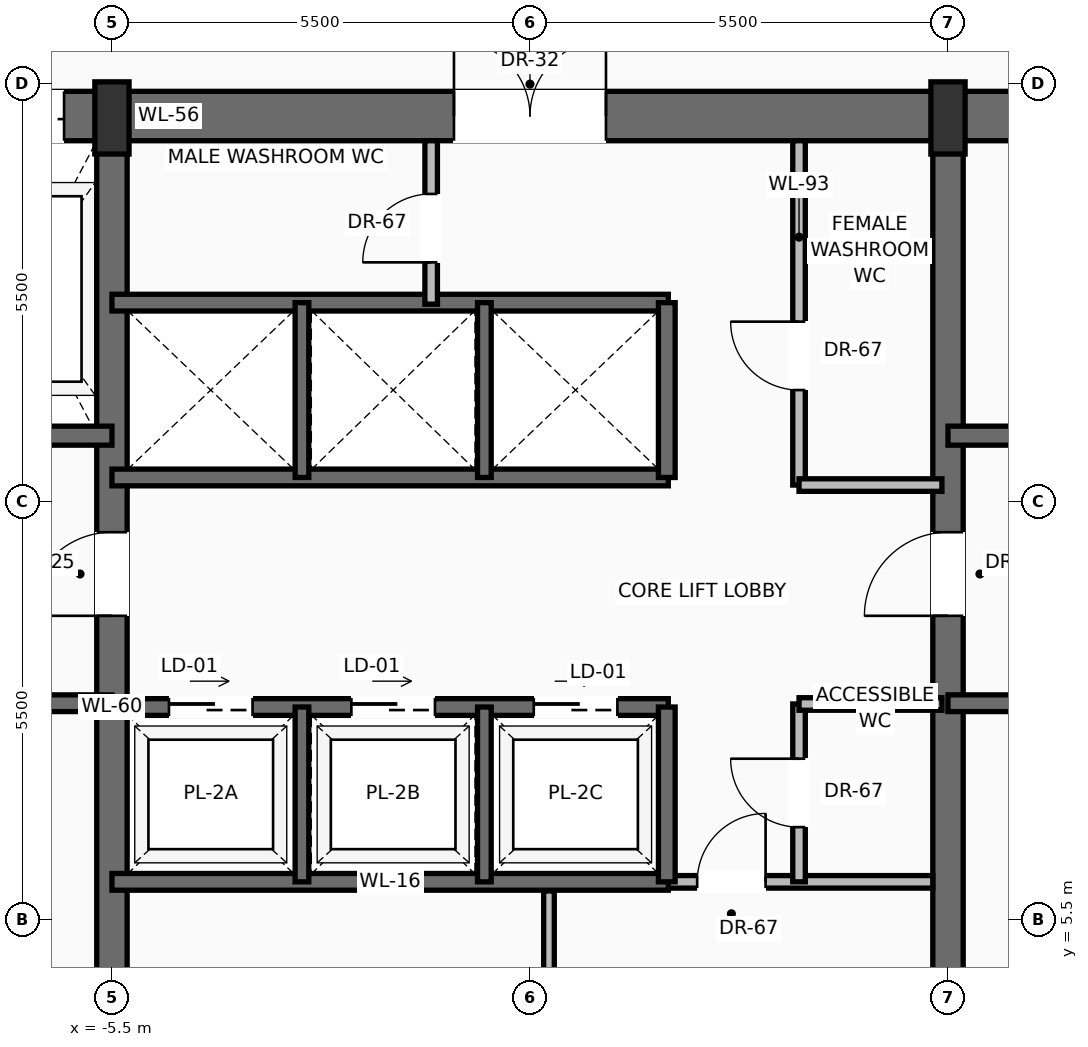
"""IFC4 building model, lengths in metres.
Left out: names, types, materials, properties, quantities, classifications, styles, units other than length and angle.
Written with IfcOpenShell. Run it as: python <this file> out.ifc"""

import sys

from ifc_helpers import new_model, si_unit, direction, frame, frame_2d, origin, origin_2d, place, context, subcontext, project, spatial, rectangle, extrude, source, transform, mapped, element, fill, save


model = new_model("IFC4")
c1 = context("Model", 3, precision=1e-05, world=origin(), true_north=direction((0.0, 1.0)))
c2 = subcontext(c1, "Body", "Model", "MODEL_VIEW")
j1 = project(units=[si_unit("LENGTHUNIT", "METRE"), si_unit("PLANEANGLEUNIT", "RADIAN")], contexts=[c1])
p1 = place(None, origin())
s1 = spatial("IfcSite", under=j1, at=p1, CompositionType="ELEMENT")
p2 = place(p1, origin())
s2 = spatial("IfcBuilding", under=s1, at=p2, CompositionType="ELEMENT")
p3 = place(p2, frame((0.0, 0.0, 185.8)))
s3 = spatial("IfcBuildingStorey", under=s2, at=p3, CompositionType="ELEMENT", Elevation=185.8)
p4 = place(p3, frame((-10.8, 16.075, 0.0), z_axis=(0.0, 0.0, 1.0), x_axis=(1.0, 0.0, 0.0)))
e1 = element("IfcWall", 1, at=p4, inside=s3, PredefinedType="SHEAR", context=c2, shape_type="SweptSolid", body=[
    extrude(rectangle(XDim=21.6, YDim=0.65, at=frame_2d((10.8, 0.0))), origin(), (0.0, 0.0, 1.0), 3.47),
])
p5 = place(p4, frame((3.37, 0.0, 0.0)))
e2 = element("IfcOpeningElement", 2, at=p5, cuts=e1, PredefinedType="OPENING", context=c2, shape_type="SweptSolid", body=[
    extrude(rectangle(XDim=1.3, YDim=2.3, at=frame_2d((0.65, 1.15))), frame((0.0, 0.335, 0.0), z_axis=(0.0, -1.0, 0.0), x_axis=(1.0, 0.0, 0.0)), (0.0, 0.0, 1.0), 0.67),
])
p6 = place(p4, frame((9.8, 0.0, 0.0)))
e3 = element("IfcOpeningElement", 3, at=p6, cuts=e1, PredefinedType="OPENING", context=c2, shape_type="SweptSolid", body=[
    extrude(rectangle(XDim=2.0, YDim=2.4, at=frame_2d((1.0, 1.2))), frame((0.0, 0.335, 0.0), z_axis=(0.0, -1.0, 0.0), x_axis=(1.0, 0.0, 0.0)), (0.0, 0.0, 1.0), 0.67),
])
p7 = place(p3, frame((-5.5, 0.525, 0.0), z_axis=(0.0, 0.0, 1.0), x_axis=(0.0, 1.0, 0.0)))
e4 = element("IfcWall", 4, at=p7, inside=s3, PredefinedType="SHEAR", context=c2, shape_type="SweptSolid", body=[
    extrude(rectangle(XDim=15.55, YDim=0.4, at=frame_2d((7.775, 0.0))), origin(), (0.0, 0.0, 1.0), 3.47),
])
p8 = place(p7, frame((8.975, 0.0, 0.0)))
e5 = element("IfcOpeningElement", 5, at=p8, cuts=e4, PredefinedType="OPENING", context=c2, shape_type="SweptSolid", body=[
    extrude(rectangle(XDim=1.1, YDim=2.2, at=frame_2d((0.55, 1.1))), frame((0.0, 0.21, 0.0), z_axis=(0.0, -1.0, 0.0), x_axis=(1.0, 0.0, 0.0)), (0.0, 0.0, 1.0), 0.42),
])
p9 = place(p3, frame((5.5, 0.525, 0.0), z_axis=(0.0, 0.0, 1.0), x_axis=(0.0, 1.0, 0.0)))
e6 = element("IfcWall", 6, at=p9, inside=s3, PredefinedType="SHEAR", context=c2, shape_type="SweptSolid", body=[
    extrude(rectangle(XDim=15.55, YDim=0.4, at=frame_2d((7.775, 0.0))), origin(), (0.0, 0.0, 1.0), 3.47),
])
p10 = place(p9, frame((8.975, 0.0, 0.0)))
e7 = element("IfcOpeningElement", 7, at=p10, cuts=e6, PredefinedType="OPENING", context=c2, shape_type="SweptSolid", body=[
    extrude(rectangle(XDim=1.1, YDim=2.2, at=frame_2d((0.55, 1.1))), frame((0.0, 0.21, 0.0), z_axis=(0.0, -1.0, 0.0), x_axis=(1.0, 0.0, 0.0)), (0.0, 0.0, 1.0), 0.42),
])
m1 = source(origin(), c2, "Body", "SweptSolid", [
    extrude(rectangle(XDim=0.45, YDim=0.95, at=origin_2d()), origin(), (0.0, 0.0, 1.0), 3.7),
])
for number, where, z_axis, x_axis in (
    (8, (-5.5, 16.05, 0.0), (0.0, 0.0, 1.0), (1.0, 0.0, 0.0)),
    (9, (5.5, 16.05, 0.0), (0.0, 0.0, 1.0), (1.0, 0.0, 0.0)),
):
    element("IfcColumn", number, at=place(p3, frame(where, z_axis=z_axis, x_axis=x_axis)), inside=s3, PredefinedType="PILASTER", context=c2, shape_type="MappedRepresentation", body=[
        mapped(m1, transform((0.0, 0.0, 0.0), scale=1.0)),
    ])
p11 = place(p3, frame((-5.5, 8.35, 0.0), z_axis=(0.0, 0.0, 1.0), x_axis=(-1.0, 0.0, 0.0)))
e10 = element("IfcWall", 10, at=p11, inside=s3, PredefinedType="SOLIDWALL", context=c2, shape_type="SweptSolid", body=[
    extrude(rectangle(XDim=4.65, YDim=0.22, at=frame_2d((2.325, 0.0))), origin(), (0.0, 0.0, 1.0), 3.47),
])
p12 = place(p11, frame((2.5, 0.0, 0.0)))
e11 = element("IfcOpeningElement", 11, at=p12, cuts=e10, PredefinedType="OPENING", context=c2, shape_type="SweptSolid", body=[
    extrude(rectangle(XDim=1.15, YDim=2.2, at=frame_2d((0.575, 1.1))), frame((0.0, 0.12, 0.0), z_axis=(0.0, -1.0, 0.0), x_axis=(1.0, 0.0, 0.0)), (0.0, 0.0, 1.0), 0.24),
])
p13 = place(p3, frame((-5.5, 11.87, 0.0), z_axis=(0.0, 0.0, 1.0), x_axis=(-1.0, 0.0, 0.0)))
e12 = element("IfcWall", 12, at=p13, inside=s3, PredefinedType="SOLIDWALL", context=c2, shape_type="SweptSolid", body=[
    extrude(rectangle(XDim=4.65, YDim=0.25, at=frame_2d((2.325, 0.0))), origin(), (0.0, 0.0, 1.0), 3.47),
])
p14 = place(p13, frame((2.95, 0.0, 0.0)))
e13 = element("IfcOpeningElement", 13, at=p14, cuts=e12, PredefinedType="OPENING", context=c2, shape_type="SweptSolid", body=[
    extrude(rectangle(XDim=1.2, YDim=2.25, at=frame_2d((0.6, 1.125))), frame((0.0, 0.135, 0.0), z_axis=(0.0, -1.0, 0.0), x_axis=(1.0, 0.0, 0.0)), (0.0, 0.0, 1.0), 0.27),
])
p15 = place(p3, frame((10.15, 8.35, 0.0), z_axis=(0.0, 0.0, 1.0), x_axis=(-1.0, 0.0, 0.0)))
e14 = element("IfcWall", 14, at=p15, inside=s3, PredefinedType="SOLIDWALL", context=c2, shape_type="SweptSolid", body=[
    extrude(rectangle(XDim=4.65, YDim=0.22, at=frame_2d((2.325, 0.0))), origin(), (0.0, 0.0, 1.0), 3.47),
])
p16 = place(p15, frame((1.0, 0.0, 0.0)))
e15 = element("IfcOpeningElement", 15, at=p16, cuts=e14, PredefinedType="OPENING", context=c2, shape_type="SweptSolid", body=[
    extrude(rectangle(XDim=1.15, YDim=2.2, at=frame_2d((0.575, 1.1))), frame((0.0, 0.12, 0.0), z_axis=(0.0, -1.0, 0.0), x_axis=(1.0, 0.0, 0.0)), (0.0, 0.0, 1.0), 0.24),
])
p17 = place(p3, frame((10.15, 11.87, 0.0), z_axis=(0.0, 0.0, 1.0), x_axis=(-1.0, 0.0, 0.0)))
e16 = element("IfcWall", 16, at=p17, inside=s3, PredefinedType="SOLIDWALL", context=c2, shape_type="SweptSolid", body=[
    extrude(rectangle(XDim=4.65, YDim=0.25, at=frame_2d((2.325, 0.0))), origin(), (0.0, 0.0, 1.0), 3.47),
])
p18 = place(p17, frame((0.5, 0.0, 0.0)))
e17 = element("IfcOpeningElement", 17, at=p18, cuts=e16, PredefinedType="OPENING", context=c2, shape_type="SweptSolid", body=[
    extrude(rectangle(XDim=1.2, YDim=2.25, at=frame_2d((0.6, 1.125))), frame((0.0, 0.135, 0.0), z_axis=(0.0, -1.0, 0.0), x_axis=(1.0, 0.0, 0.0)), (0.0, 0.0, 1.0), 0.27),
])
p19 = place(p3, frame((1.82, 6.0, 0.0), z_axis=(0.0, 0.0, 1.0), x_axis=(1.0, 0.0, 0.0)))
e18 = element("IfcWall", 18, at=p19, inside=s3, PredefinedType="PARTITIONING", context=c2, shape_type="SweptSolid", body=[
    extrude(rectangle(XDim=3.48, YDim=0.165, at=frame_2d((1.74, 0.0))), origin(), (0.0, 0.0, 1.0), 3.462),
])
p20 = place(p19, frame((0.38, 0.0, 0.0)))
e19 = element("IfcOpeningElement", 19, at=p20, cuts=e18, PredefinedType="OPENING", context=c2, shape_type="SweptSolid", body=[
    extrude(rectangle(XDim=0.9, YDim=2.1, at=frame_2d((0.45, 1.05))), frame((0.0, 0.093, 0.0), z_axis=(0.0, -1.0, 0.0), x_axis=(1.0, 0.0, 0.0)), (0.0, 0.0, 1.0), 0.185),
])
p21 = place(p3, frame((0.25, 0.85, 0.0), z_axis=(0.0, 0.0, 1.0), x_axis=(0.0, 1.0, 0.0)))
e20 = element("IfcWall", 20, at=p21, inside=s3, PredefinedType="PARTITIONING", context=c2, shape_type="SweptSolid", body=[
    extrude(rectangle(XDim=5.03, YDim=0.14, at=frame_2d((2.515, 0.0))), origin(), (0.0, 0.0, 1.0), 3.462),
])
p22 = place(p21, frame((2.1, 0.0, 0.0)))
e21 = element("IfcOpeningElement", 21, at=p22, cuts=e20, PredefinedType="OPENING", context=c2, shape_type="SweptSolid", body=[
    extrude(rectangle(XDim=0.9, YDim=2.1, at=frame_2d((0.45, 1.05))), frame((0.0, 0.08, 0.0), z_axis=(0.0, -1.0, 0.0), x_axis=(1.0, 0.0, 0.0)), (0.0, 0.0, 1.0), 0.16),
])
p23 = place(p3, frame((3.54, 6.0, 0.0), z_axis=(0.0, 0.0, 1.0), x_axis=(0.0, 1.0, 0.0)))
e22 = element("IfcWall", 22, at=p23, inside=s3, PredefinedType="PARTITIONING", context=c2, shape_type="SweptSolid", body=[
    extrude(rectangle(XDim=2.34, YDim=0.165, at=frame_2d((1.17, 0.0))), origin(), (0.0, 0.0, 1.0), 3.462),
])
p24 = place(p23, frame((0.72, 0.0, 0.0)))
e23 = element("IfcOpeningElement", 23, at=p24, cuts=e22, PredefinedType="OPENING", context=c2, shape_type="SweptSolid", body=[
    extrude(rectangle(XDim=0.9, YDim=2.1, at=frame_2d((0.45, 1.05))), frame((0.0, 0.093, 0.0), z_axis=(0.0, -1.0, 0.0), x_axis=(1.0, 0.0, 0.0)), (0.0, 0.0, 1.0), 0.185),
])
p25 = place(p3, frame((3.54, 8.34, 0.0), z_axis=(0.0, 0.0, 1.0), x_axis=(1.0, 0.0, 0.0)))
e24 = element("IfcWall", 24, at=p25, inside=s3, PredefinedType="PARTITIONING", context=c2, shape_type="SweptSolid", body=[
    extrude(rectangle(XDim=1.88, YDim=0.165, at=frame_2d((0.94, 0.0))), origin(), (0.0, 0.0, 1.0), 3.462),
])
p26 = place(p3, frame((-5.5, 6.0, 0.0), z_axis=(0.0, 0.0, 1.0), x_axis=(1.0, 0.0, 0.0)))
e25 = element("IfcWall", 25, at=p26, inside=s3, PredefinedType="SOLIDWALL", context=c2, shape_type="SweptSolid", body=[
    extrude(rectangle(XDim=7.32, YDim=0.22, at=frame_2d((3.66, 0.0))), origin(), (0.0, 0.0, 1.0), 3.47),
])
p27 = place(p3, frame((-5.5, 8.3, 0.0), z_axis=(0.0, 0.0, 1.0), x_axis=(1.0, 0.0, 0.0)))
e26 = element("IfcWall", 26, at=p27, inside=s3, PredefinedType="SOLIDWALL", context=c2, shape_type="SweptSolid", body=[
    extrude(rectangle(XDim=7.32, YDim=0.22, at=frame_2d((3.66, 0.0))), origin(), (0.0, 0.0, 1.0), 3.47),
])
p28 = place(p27, frame((0.75, 0.0, 0.0)))
e27 = element("IfcOpeningElement", 27, at=p28, cuts=e26, PredefinedType="OPENING", context=c2, shape_type="SweptSolid", body=[
    extrude(rectangle(XDim=1.1, YDim=2.2, at=frame_2d((0.55, 1.1))), frame((0.0, 0.12, 0.0), z_axis=(0.0, -1.0, 0.0), x_axis=(1.0, 0.0, 0.0)), (0.0, 0.0, 1.0), 0.24),
])
p29 = place(p27, frame((3.15, 0.0, 0.0)))
e28 = element("IfcOpeningElement", 28, at=p29, cuts=e26, PredefinedType="OPENING", context=c2, shape_type="SweptSolid", body=[
    extrude(rectangle(XDim=1.1, YDim=2.2, at=frame_2d((0.55, 1.1))), frame((0.0, 0.12, 0.0), z_axis=(0.0, -1.0, 0.0), x_axis=(1.0, 0.0, 0.0)), (0.0, 0.0, 1.0), 0.24),
])
p30 = place(p27, frame((5.55, 0.0, 0.0)))
e29 = element("IfcOpeningElement", 29, at=p30, cuts=e26, PredefinedType="OPENING", context=c2, shape_type="SweptSolid", body=[
    extrude(rectangle(XDim=1.1, YDim=2.2, at=frame_2d((0.55, 1.1))), frame((0.0, 0.12, 0.0), z_axis=(0.0, -1.0, 0.0), x_axis=(1.0, 0.0, 0.0)), (0.0, 0.0, 1.0), 0.24),
])
p31 = place(p3, frame((1.8, 6.0, 0.0), z_axis=(0.0, 0.0, 1.0), x_axis=(0.0, 1.0, 0.0)))
e30 = element("IfcWall", 30, at=p31, inside=s3, PredefinedType="SOLIDWALL", context=c2, shape_type="SweptSolid", body=[
    extrude(rectangle(XDim=2.3, YDim=0.22, at=frame_2d((1.15, 0.0))), origin(), (0.0, 0.0, 1.0), 3.47),
])
for number, where, z_axis, x_axis in (
    (31, (-3.0, 6.0, 0.0), (0.0, 0.0, 1.0), (0.0, 1.0, 0.0)),
    (32, (-0.6, 6.0, 0.0), (0.0, 0.0, 1.0), (0.0, 1.0, 0.0)),
):
    element("IfcWall", number, at=place(p3, frame(where, z_axis=z_axis, x_axis=x_axis)), inside=s3, PredefinedType="SOLIDWALL", context=c2, shape_type="SweptSolid", body=[
        extrude(rectangle(XDim=2.3, YDim=0.18, at=frame_2d((1.15, 0.0))), origin(), (0.0, 0.0, 1.0), 3.47),
    ])
for number, where, z_axis, x_axis in (
    (33, (-5.5, 11.32, 0.0), (0.0, 0.0, 1.0), (1.0, 0.0, 0.0)),
    (34, (-5.5, 13.62, 0.0), (0.0, 0.0, 1.0), (1.0, 0.0, 0.0)),
):
    element("IfcWall", number, at=place(p3, frame(where, z_axis=z_axis, x_axis=x_axis)), inside=s3, PredefinedType="SOLIDWALL", context=c2, shape_type="SweptSolid", body=[
        extrude(rectangle(XDim=7.32, YDim=0.22, at=frame_2d((3.66, 0.0))), origin(), (0.0, 0.0, 1.0), 3.47),
    ])
p32 = place(p3, frame((1.8, 11.32, 0.0), z_axis=(0.0, 0.0, 1.0), x_axis=(0.0, 1.0, 0.0)))
e35 = element("IfcWall", 35, at=p32, inside=s3, PredefinedType="SOLIDWALL", context=c2, shape_type="SweptSolid", body=[
    extrude(rectangle(XDim=2.3, YDim=0.22, at=frame_2d((1.15, 0.0))), origin(), (0.0, 0.0, 1.0), 3.47),
])
for number, where, z_axis, x_axis in (
    (36, (-3.0, 11.32, 0.0), (0.0, 0.0, 1.0), (0.0, 1.0, 0.0)),
    (37, (-0.6, 11.32, 0.0), (0.0, 0.0, 1.0), (0.0, 1.0, 0.0)),
):
    element("IfcWall", number, at=place(p3, frame(where, z_axis=z_axis, x_axis=x_axis)), inside=s3, PredefinedType="SOLIDWALL", context=c2, shape_type="SweptSolid", body=[
        extrude(rectangle(XDim=2.3, YDim=0.18, at=frame_2d((1.15, 0.0))), origin(), (0.0, 0.0, 1.0), 3.47),
    ])
p33 = place(p3, frame((-1.3, 13.6, 0.0), z_axis=(0.0, 0.0, 1.0), x_axis=(0.0, 1.0, 0.0)))
e38 = element("IfcWall", 38, at=p33, inside=s3, PredefinedType="PARTITIONING", context=c2, shape_type="SweptSolid", body=[
    extrude(rectangle(XDim=2.15, YDim=0.165, at=frame_2d((1.075, 0.0))), origin(), (0.0, 0.0, 1.0), 3.462),
])
p34 = place(p33, frame((0.55, 0.0, 0.0)))
e39 = element("IfcOpeningElement", 39, at=p34, cuts=e38, PredefinedType="OPENING", context=c2, shape_type="SweptSolid", body=[
    extrude(rectangle(XDim=0.9, YDim=2.1, at=frame_2d((0.45, 1.05))), frame((0.0, 0.093, 0.0), z_axis=(0.0, -1.0, 0.0), x_axis=(1.0, 0.0, 0.0)), (0.0, 0.0, 1.0), 0.185),
])
p35 = place(p3, frame((3.54, 11.22, 0.0), z_axis=(0.0, 0.0, 1.0), x_axis=(0.0, 1.0, 0.0)))
e40 = element("IfcWall", 40, at=p35, inside=s3, PredefinedType="PARTITIONING", context=c2, shape_type="SweptSolid", body=[
    extrude(rectangle(XDim=4.53, YDim=0.165, at=frame_2d((2.265, 0.0))), origin(), (0.0, 0.0, 1.0), 3.462),
])
p36 = place(p35, frame((1.25, 0.0, 0.0)))
e41 = element("IfcOpeningElement", 41, at=p36, cuts=e40, PredefinedType="OPENING", context=c2, shape_type="SweptSolid", body=[
    extrude(rectangle(XDim=0.9, YDim=2.1, at=frame_2d((0.45, 1.05))), frame((0.0, 0.093, 0.0), z_axis=(0.0, -1.0, 0.0), x_axis=(1.0, 0.0, 0.0)), (0.0, 0.0, 1.0), 0.185),
])
p37 = place(p3, frame((3.54, 11.22, 0.0), z_axis=(0.0, 0.0, 1.0), x_axis=(1.0, 0.0, 0.0)))
e42 = element("IfcWall", 42, at=p37, inside=s3, PredefinedType="PARTITIONING", context=c2, shape_type="SweptSolid", body=[
    extrude(rectangle(XDim=1.88, YDim=0.165, at=frame_2d((0.94, 0.0))), origin(), (0.0, 0.0, 1.0), 3.462),
])
m2 = source(origin(), c2, "Body", "SweptSolid", [
    extrude(rectangle(XDim=1.1, YDim=2.2, at=frame_2d((0.55, 1.1))), frame((0.0, 0.025, 0.0), z_axis=(0.0, -1.0, 0.0), x_axis=(1.0, 0.0, 0.0)), (0.0, 0.0, 1.0), 0.05),
])
p38 = place(p8, origin())
e43 = element("IfcDoor", 43, at=p38, inside=s3, OperationType="SINGLE_SWING_LEFT", PredefinedType="DOOR", context=c2, shape_type="MappedRepresentation", body=[
    mapped(m2, transform((0.0, 0.0, 0.0), scale=1.0)),
])
fill(e5, e43)
m3 = source(origin(), c2, "Body", "SweptSolid", [
    extrude(rectangle(XDim=1.3, YDim=2.3, at=frame_2d((0.65, 1.15))), frame((0.0, 0.025, 0.0), z_axis=(0.0, -1.0, 0.0), x_axis=(1.0, 0.0, 0.0)), (0.0, 0.0, 1.0), 0.05),
])
p39 = place(p5, origin())
e44 = element("IfcDoor", 44, at=p39, inside=s3, OperationType="SLIDING_TO_RIGHT", PredefinedType="DOOR", context=c2, shape_type="MappedRepresentation", body=[
    mapped(m3, transform((0.0, 0.0, 0.0), scale=1.0)),
])
fill(e2, e44)
p40 = place(p10, origin())
e45 = element("IfcDoor", 45, at=p40, inside=s3, OperationType="SINGLE_SWING_LEFT", PredefinedType="DOOR", context=c2, shape_type="MappedRepresentation", body=[
    mapped(m2, transform((0.0, 0.0, 0.0), scale=1.0)),
])
fill(e7, e45)
m4 = source(origin(), c2, "Body", "SweptSolid", [
    extrude(rectangle(XDim=2.0, YDim=2.4, at=frame_2d((1.0, 1.2))), frame((0.0, 0.025, 0.0), z_axis=(0.0, -1.0, 0.0), x_axis=(1.0, 0.0, 0.0)), (0.0, 0.0, 1.0), 0.05),
])
p41 = place(p6, origin())
e46 = element("IfcDoor", 46, at=p41, inside=s3, OperationType="DOUBLE_DOOR_SINGLE_SWING", PredefinedType="DOOR", context=c2, shape_type="MappedRepresentation", body=[
    mapped(m4, transform((0.0, 0.0, 0.0), scale=1.0)),
])
fill(e3, e46)
m5 = source(origin(), c2, "Body", "SweptSolid", [
    extrude(rectangle(XDim=0.9, YDim=2.1, at=frame_2d((0.45, 1.05))), frame((0.0, 0.025, 0.0), z_axis=(0.0, -1.0, 0.0), x_axis=(1.0, 0.0, 0.0)), (0.0, 0.0, 1.0), 0.05),
])
p42 = place(p20, origin())
e47 = element("IfcDoor", 47, at=p42, inside=s3, OperationType="SINGLE_SWING_RIGHT", PredefinedType="DOOR", context=c2, shape_type="MappedRepresentation", body=[
    mapped(m5, transform((0.0, 0.0, 0.0), scale=1.0)),
])
fill(e19, e47)
p43 = place(p24, origin())
e48 = element("IfcDoor", 48, at=p43, inside=s3, OperationType="SINGLE_SWING_RIGHT", PredefinedType="DOOR", context=c2, shape_type="MappedRepresentation", body=[
    mapped(m5, transform((0.0, 0.0, 0.0), scale=1.0)),
])
fill(e23, e48)
m6 = source(origin(), c2, "Body", "SweptSolid", [
    extrude(rectangle(XDim=1.1, YDim=2.2, at=frame_2d((0.55, 1.1))), frame((0.0, 0.025, 0.0), z_axis=(0.0, -1.0, 0.0), x_axis=(1.0, 0.0, 0.0)), (0.0, 0.0, 1.0), 0.05),
])
p44 = place(p28, origin())
e49 = element("IfcDoor", 49, at=p44, inside=s3, OperationType="SLIDING_TO_LEFT", PredefinedType="DOOR", context=c2, shape_type="MappedRepresentation", body=[
    mapped(m6, transform((0.0, 0.0, 0.0), scale=1.0)),
])
fill(e27, e49)
p45 = place(p29, origin())
e50 = element("IfcDoor", 50, at=p45, inside=s3, OperationType="SLIDING_TO_LEFT", PredefinedType="DOOR", context=c2, shape_type="MappedRepresentation", body=[
    mapped(m6, transform((0.0, 0.0, 0.0), scale=1.0)),
])
fill(e28, e50)
p46 = place(p30, origin())
e51 = element("IfcDoor", 51, at=p46, inside=s3, OperationType="SLIDING_TO_LEFT", PredefinedType="DOOR", context=c2, shape_type="MappedRepresentation", body=[
    mapped(m6, transform((0.0, 0.0, 0.0), scale=1.0)),
])
fill(e29, e51)
p47 = place(p34, origin())
e52 = element("IfcDoor", 52, at=p47, inside=s3, OperationType="SINGLE_SWING_LEFT", PredefinedType="DOOR", context=c2, shape_type="MappedRepresentation", body=[
    mapped(m5, transform((0.0, 0.0, 0.0), scale=1.0)),
])
fill(e39, e52)
p48 = place(p36, origin())
e53 = element("IfcDoor", 53, at=p48, inside=s3, OperationType="SINGLE_SWING_RIGHT", PredefinedType="DOOR", context=c2, shape_type="MappedRepresentation", body=[
    mapped(m5, transform((0.0, 0.0, 0.0), scale=1.0)),
])
fill(e41, e53)
save(model, sys.argv[1])
